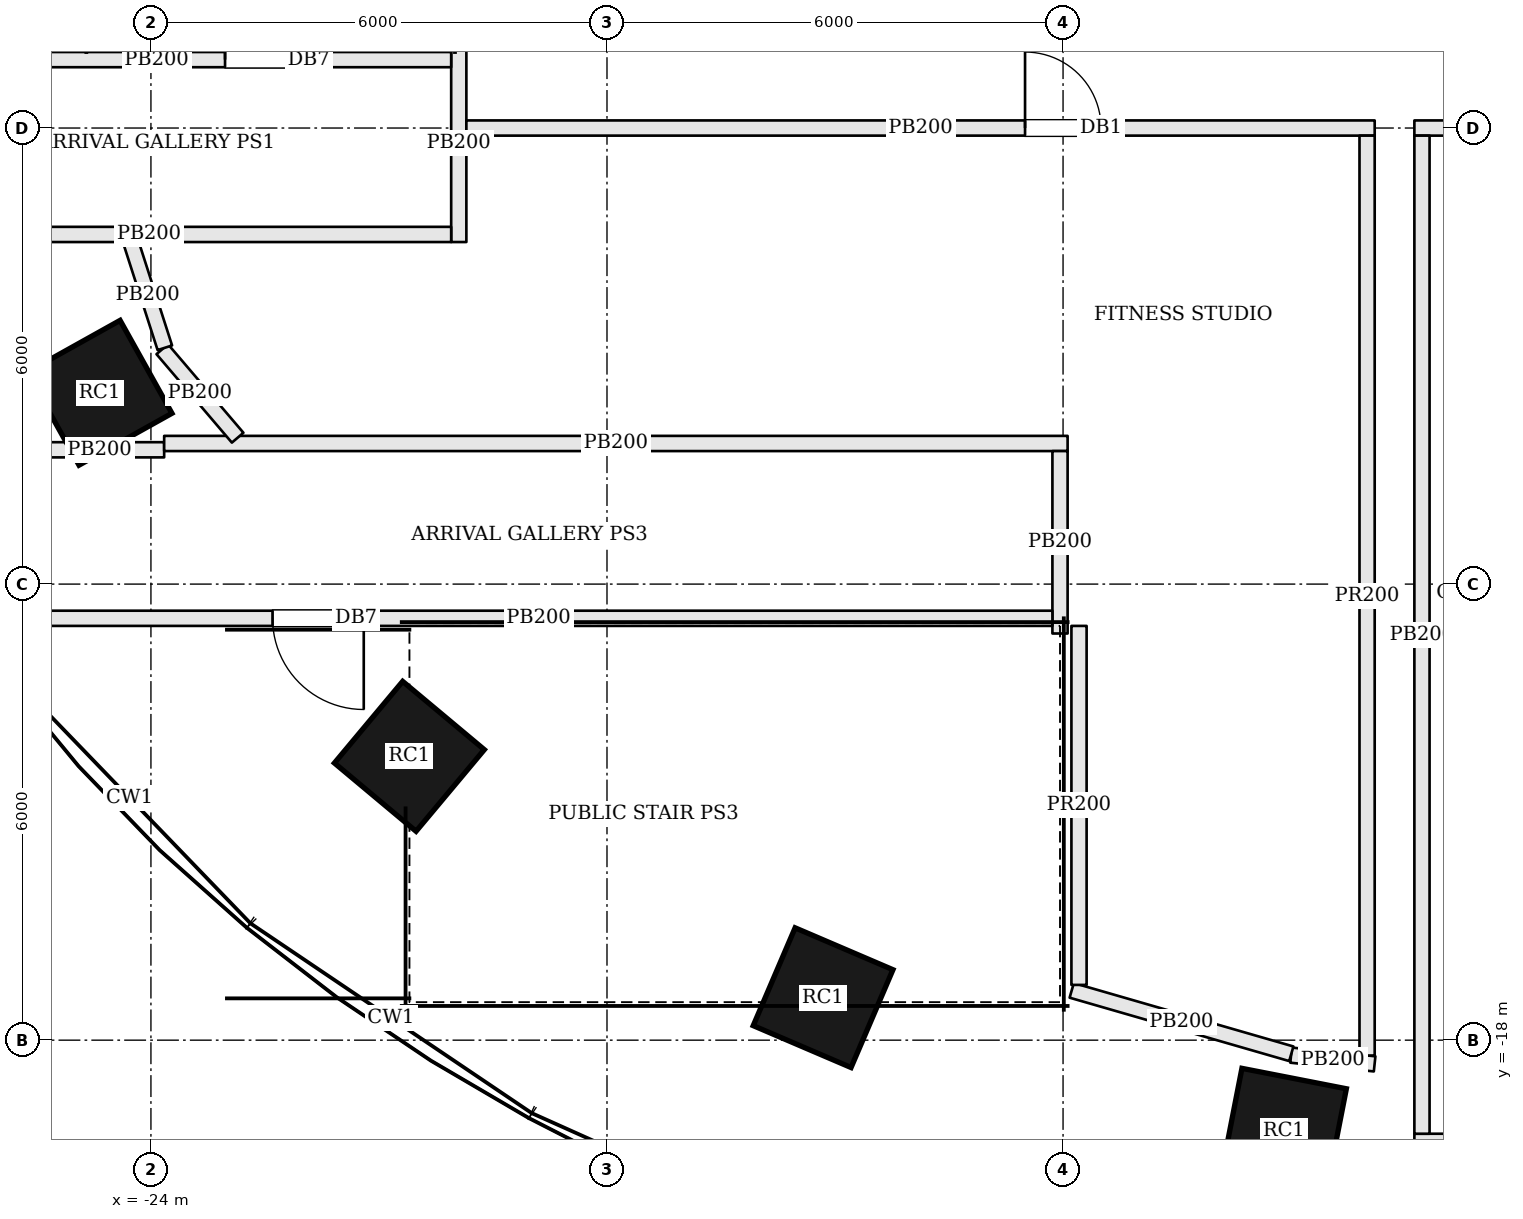
"""IFC4 building model, lengths in metres.
Left out: names, types, materials, properties, quantities, classifications, styles, units other than length and angle.
Written with IfcOpenShell. Run it as: python <this file> out.ifc"""

import sys

from ifc_helpers import new_model, si_unit, direction, frame, frame_2d, origin, origin_2d, place, context, subcontext, project, spatial, rectangle, extrude, element, fill, save


model = new_model("IFC4")
c1 = context("Model", 3, precision=1e-05, world=origin(), true_north=direction((0.0, 1.0)))
c2 = subcontext(c1, "Body", "Model", "MODEL_VIEW")
j1 = project(units=[si_unit("LENGTHUNIT", "METRE"), si_unit("PLANEANGLEUNIT", "RADIAN")], contexts=[c1])
p1 = place(None, origin())
s1 = spatial("IfcSite", under=j1, at=p1, CompositionType="ELEMENT")
p2 = place(p1, origin())
s2 = spatial("IfcBuilding", under=s1, at=p2, CompositionType="ELEMENT")
p3 = place(p2, frame((0.0, 0.0, 28.2)))
s3 = spatial("IfcBuildingStorey", under=s2, at=p3, CompositionType="ELEMENT", Elevation=28.2)
for number, where, z_axis, x_axis in (
    (1, (-24.676, -9.483, 0.0), (0.0, 0.0, 1.0), (0.487, -0.873, 0.0)),
    (2, (-20.6, -14.266, 0.0), (0.0, 0.0, 1.0), (0.767, -0.641, 0.0)),
    (3, (-15.157, -17.441, 0.0), (0.0, 0.0, 1.0), (0.919, -0.394, 0.0)),
    (4, (-9.094, -19.192, 0.0), (0.0, 0.0, 1.0), (0.981, -0.192, 0.0)),
):
    element("IfcColumn", number, at=place(p3, frame(where, z_axis=z_axis, x_axis=x_axis)), inside=s3, PredefinedType="COLUMN", context=c2, shape_type="SweptSolid", body=[
        extrude(rectangle(XDim=1.4, YDim=1.4, at=origin_2d()), origin(), (0.0, 0.0, 1.0), 4.8),
    ])
p4 = place(p3, frame((-19.95, -4.9, 0.0), z_axis=(0.0, 0.0, 1.0), x_axis=(0.0, -1.0, 0.0)))
e5 = element("IfcWall", 5, at=p4, inside=s3, PredefinedType="PARTITIONING", context=c2, shape_type="SweptSolid", body=[
    extrude(rectangle(XDim=2.6, YDim=0.2, at=frame_2d((1.3, 0.0))), origin(), (0.0, 0.0, 1.0), 3.78),
])
p5 = place(p3, frame((-20.05, -7.4, 0.0), z_axis=(0.0, 0.0, 1.0), x_axis=(-1.0, 0.0, 0.0)))
e6 = element("IfcWall", 6, at=p5, inside=s3, PredefinedType="PARTITIONING", context=c2, shape_type="SweptSolid", body=[
    extrude(rectangle(XDim=7.95, YDim=0.2, at=frame_2d((3.975, 0.0))), origin(), (0.0, 0.0, 1.0), 3.78),
])
p6 = place(p5, frame((5.976, 0.0, 0.0)))
e7 = element("IfcOpeningElement", 7, at=p6, cuts=e6, PredefinedType="OPENING", context=c2, shape_type="SweptSolid", body=[
    extrude(rectangle(XDim=1.2, YDim=2.1, at=frame_2d((0.6, 1.05))), frame((0.0, 0.11, 0.0), z_axis=(0.0, -1.0, 0.0), x_axis=(1.0, 0.0, 0.0)), (0.0, 0.0, 1.0), 0.22),
])
p7 = place(p3, frame((-27.8, -5.1, 0.0), z_axis=(0.0, 0.0, 1.0), x_axis=(1.0, 0.0, 0.0)))
e8 = element("IfcWall", 8, at=p7, inside=s3, PredefinedType="PARTITIONING", context=c2, shape_type="SweptSolid", body=[
    extrude(rectangle(XDim=7.75, YDim=0.2, at=frame_2d((3.875, 0.0))), origin(), (0.0, 0.0, 1.0), 3.78),
])
p8 = place(p7, frame((4.775, 0.0, 0.0)))
e9 = element("IfcOpeningElement", 9, at=p8, cuts=e8, PredefinedType="OPENING", context=c2, shape_type="SweptSolid", body=[
    extrude(rectangle(XDim=1.2, YDim=2.1, at=frame_2d((0.6, 1.05))), frame((0.0, 0.11, 0.0), z_axis=(0.0, -1.0, 0.0), x_axis=(1.0, 0.0, 0.0)), (0.0, 0.0, 1.0), 0.22),
])
p9 = place(p3, frame((-25.526, -10.233, 0.0), z_axis=(0.0, 0.0, 1.0), x_axis=(1.0, 0.0, 0.0)))
e10 = element("IfcWall", 10, at=p9, inside=s3, PredefinedType="PARTITIONING", context=c2, shape_type="SweptSolid", body=[
    extrude(rectangle(XDim=1.7, YDim=0.2, at=frame_2d((0.85, 0.0))), origin(), (0.0, 0.0, 1.0), 3.78),
])
p10 = place(p3, frame((-23.826, -10.15, 0.0), z_axis=(0.0, 0.0, 1.0), x_axis=(1.0, 0.0, 0.0)))
e11 = element("IfcWall", 11, at=p10, inside=s3, PredefinedType="PARTITIONING", context=c2, shape_type="SweptSolid", body=[
    extrude(rectangle(XDim=11.886, YDim=0.2, at=frame_2d((5.943, 0.0))), origin(), (0.0, 0.0, 1.0), 3.78),
])
p11 = place(p3, frame((-12.04, -10.25, 0.0), z_axis=(0.0, 0.0, 1.0), x_axis=(0.0, -1.0, 0.0)))
e12 = element("IfcWall", 12, at=p11, inside=s3, PredefinedType="PARTITIONING", context=c2, shape_type="SweptSolid", body=[
    extrude(rectangle(XDim=2.4, YDim=0.2, at=frame_2d((1.2, 0.0))), origin(), (0.0, 0.0, 1.0), 3.78),
])
p12 = place(p3, frame((-12.14, -12.45, 0.0), z_axis=(0.0, 0.0, 1.0), x_axis=(-1.0, 0.0, 0.0)))
e13 = element("IfcWall", 13, at=p12, inside=s3, PredefinedType="PARTITIONING", context=c2, shape_type="SweptSolid", body=[
    extrude(rectangle(XDim=13.52, YDim=0.2, at=frame_2d((6.76, 0.0))), origin(), (0.0, 0.0, 1.0), 3.78),
])
p13 = place(p12, frame((9.06, 0.0, 0.0)))
e14 = element("IfcOpeningElement", 14, at=p13, cuts=e13, PredefinedType="OPENING", context=c2, shape_type="SweptSolid", body=[
    extrude(rectangle(XDim=1.2, YDim=2.1, at=frame_2d((0.6, 1.05))), frame((0.0, 0.11, 0.0), z_axis=(0.0, -1.0, 0.0), x_axis=(1.0, 0.0, 0.0)), (0.0, 0.0, 1.0), 0.22),
])
p14 = place(p3, frame((-7.378, -6.0, 0.0), z_axis=(0.0, 0.0, 1.0), x_axis=(1.0, 0.0, 0.0)))
e15 = element("IfcWall", 15, at=p14, inside=s3, PredefinedType="PARTITIONING", context=c2, shape_type="SweptSolid", body=[
    extrude(rectangle(XDim=25.978, YDim=0.2, at=frame_2d((12.989, 0.0))), origin(), (0.0, 0.0, 1.0), 3.78),
])
p15 = place(p14, frame((0.7, 0.0, 0.0)))
e16 = element("IfcOpeningElement", 16, at=p15, cuts=e15, PredefinedType="OPENING", context=c2, shape_type="SweptSolid", body=[
    extrude(rectangle(XDim=1.2, YDim=2.1, at=frame_2d((0.6, 1.05))), frame((0.0, 0.11, 0.0), z_axis=(0.0, -1.0, 0.0), x_axis=(1.0, 0.0, 0.0)), (0.0, 0.0, 1.0), 0.22),
])
p16 = place(p14, frame((5.939, 0.0, 0.0)))
e17 = element("IfcOpeningElement", 17, at=p16, cuts=e15, PredefinedType="OPENING", context=c2, shape_type="SweptSolid", body=[
    extrude(rectangle(XDim=1.0, YDim=2.1, at=frame_2d((0.5, 1.05))), frame((0.0, 0.11, 0.0), z_axis=(0.0, -1.0, 0.0), x_axis=(1.0, 0.0, 0.0)), (0.0, 0.0, 1.0), 0.22),
])
p17 = place(p14, frame((13.628, 0.0, 0.0)))
e18 = element("IfcOpeningElement", 18, at=p17, cuts=e15, PredefinedType="OPENING", context=c2, shape_type="SweptSolid", body=[
    extrude(rectangle(XDim=1.0, YDim=2.1, at=frame_2d((0.5, 1.05))), frame((0.0, 0.11, 0.0), z_axis=(0.0, -1.0, 0.0), x_axis=(1.0, 0.0, 0.0)), (0.0, 0.0, 1.0), 0.22),
])
p18 = place(p14, frame((20.128, 0.0, 0.0)))
e19 = element("IfcOpeningElement", 19, at=p18, cuts=e15, PredefinedType="OPENING", context=c2, shape_type="SweptSolid", body=[
    extrude(rectangle(XDim=1.0, YDim=2.1, at=frame_2d((0.5, 1.05))), frame((0.0, 0.11, 0.0), z_axis=(0.0, -1.0, 0.0), x_axis=(1.0, 0.0, 0.0)), (0.0, 0.0, 1.0), 0.22),
])
p19 = place(p3, frame((-4.978, -19.331, 0.0), z_axis=(0.0, 0.0, 1.0), x_axis=(-1.0, 0.0, 0.0)))
e20 = element("IfcWall", 20, at=p19, inside=s3, PredefinedType="PARTITIONING", context=c2, shape_type="SweptSolid", body=[
    extrude(rectangle(XDim=2.4, YDim=0.2, at=frame_2d((1.2, 0.0))), origin(), (0.0, 0.0, 1.0), 3.78),
])
p20 = place(p19, frame((0.5, 0.0, 0.0)))
e21 = element("IfcOpeningElement", 21, at=p20, cuts=e20, PredefinedType="OPENING", context=c2, shape_type="SweptSolid", body=[
    extrude(rectangle(XDim=1.2, YDim=2.1, at=frame_2d((0.6, 1.05))), frame((0.0, 0.11, 0.0), z_axis=(0.0, -1.0, 0.0), x_axis=(1.0, 0.0, 0.0)), (0.0, 0.0, 1.0), 0.22),
])
p21 = place(p3, frame((-7.278, -19.231, 0.0), z_axis=(0.0, 0.0, 1.0), x_axis=(0.0, 1.0, 0.0)))
e22 = element("IfcWall", 22, at=p21, inside=s3, PredefinedType="PARTITIONING", context=c2, shape_type="SweptSolid", body=[
    extrude(rectangle(XDim=13.131, YDim=0.2, at=frame_2d((6.565, 0.0))), origin(), (0.0, 0.0, 1.0), 3.78),
])
p22 = place(p3, frame((-7.901, -18.312, 0.0), z_axis=(0.0, 0.0, 1.0), x_axis=(-0.994571829754, 0.104052272726, 0.0)))
e23 = element("IfcWall", 23, at=p22, inside=s3, PredefinedType="PARTITIONING", context=c2, shape_type="SweptSolid", body=[
    extrude(rectangle(XDim=1.105, YDim=0.2, at=frame_2d((0.553, 0.0))), origin(), (0.0, 0.0, 1.0), 3.78),
])
p23 = place(p3, frame((-8.997, -18.179, 0.0), z_axis=(0.0, 0.0, 1.0), x_axis=(-0.960766604917, 0.277358127474, 0.0)))
e24 = element("IfcWall", 24, at=p23, inside=s3, PredefinedType="PARTITIONING", context=c2, shape_type="SweptSolid", body=[
    extrude(rectangle(XDim=3.007, YDim=0.2, at=frame_2d((1.503, 0.0))), origin(), (0.0, 0.0, 1.0), 3.78),
])
p24 = place(p3, frame((-11.79, -17.273, 0.0), z_axis=(0.0, 0.0, 1.0), x_axis=(0.0, 1.0, 0.0)))
e25 = element("IfcWall", 25, at=p24, inside=s3, PredefinedType="PARTITIONING", context=c2, shape_type="SweptSolid", body=[
    extrude(rectangle(XDim=4.723, YDim=0.2, at=frame_2d((2.361, 0.0))), origin(), (0.0, 0.0, 1.0), 3.78),
])
p25 = place(p3, frame((-22.859, -10.074, 0.0), z_axis=(0.0, 0.0, 1.0), x_axis=(-0.648685680777, 0.761056428628, 0.0)))
e26 = element("IfcWall", 26, at=p25, inside=s3, PredefinedType="PARTITIONING", context=c2, shape_type="SweptSolid", body=[
    extrude(rectangle(XDim=1.53, YDim=0.2, at=frame_2d((0.765, 0.0))), origin(), (0.0, 0.0, 1.0), 3.78),
])
p26 = place(p3, frame((-23.817, -8.891, 0.0), z_axis=(0.0, 0.0, 1.0), x_axis=(-0.306321721395, 0.951928045076, 0.0)))
e27 = element("IfcWall", 27, at=p26, inside=s3, PredefinedType="PARTITIONING", context=c2, shape_type="SweptSolid", body=[
    extrude(rectangle(XDim=1.467, YDim=0.2, at=frame_2d((0.733, 0.0))), origin(), (0.0, 0.0, 1.0), 3.78),
])
p27 = place(p3, frame((-19.85, -6.0, 0.0), z_axis=(0.0, 0.0, 1.0), x_axis=(1.0, 0.0, 0.0)))
e28 = element("IfcWall", 28, at=p27, inside=s3, PredefinedType="PARTITIONING", context=c2, shape_type="SweptSolid", body=[
    extrude(rectangle(XDim=11.95, YDim=0.2, at=frame_2d((5.975, 0.0))), origin(), (0.0, 0.0, 1.0), 3.78),
])
p28 = place(p27, frame((7.35, 0.0, 0.0)))
e29 = element("IfcOpeningElement", 29, at=p28, cuts=e28, PredefinedType="OPENING", context=c2, shape_type="SweptSolid", body=[
    extrude(rectangle(XDim=1.0, YDim=2.1, at=frame_2d((0.5, 1.05))), frame((0.0, 0.11, 0.0), z_axis=(0.0, -1.0, 0.0), x_axis=(1.0, 0.0, 0.0)), (0.0, 0.0, 1.0), 0.22),
])
p29 = place(p3, frame((-8.0, -6.1, 0.0), z_axis=(0.0, 0.0, 1.0), x_axis=(0.0, -1.0, 0.0)))
e30 = element("IfcWall", 30, at=p29, inside=s3, PredefinedType="PARTITIONING", context=c2, shape_type="SweptSolid", body=[
    extrude(rectangle(XDim=12.102, YDim=0.2, at=frame_2d((6.051, 0.0))), origin(), (0.0, 0.0, 1.0), 3.78),
])
p30 = place(p8, origin())
e31 = element("IfcDoor", 31, at=p30, inside=s3, OperationType="SINGLE_SWING_LEFT", PredefinedType="DOOR", context=c2, shape_type="SweptSolid", body=[
    extrude(rectangle(XDim=1.2, YDim=2.1, at=frame_2d((0.6, 1.05))), frame((0.0, 0.025, 0.0), z_axis=(0.0, -1.0, 0.0), x_axis=(1.0, 0.0, 0.0)), (0.0, 0.0, 1.0), 0.05),
])
fill(e9, e31)
p31 = place(p13, origin())
e32 = element("IfcDoor", 32, at=p31, inside=s3, OperationType="SINGLE_SWING_LEFT", PredefinedType="DOOR", context=c2, shape_type="SweptSolid", body=[
    extrude(rectangle(XDim=1.2, YDim=2.1, at=frame_2d((0.6, 1.05))), frame((0.0, 0.025, 0.0), z_axis=(0.0, -1.0, 0.0), x_axis=(1.0, 0.0, 0.0)), (0.0, 0.0, 1.0), 0.05),
])
fill(e14, e32)
p32 = place(p28, origin())
e33 = element("IfcDoor", 33, at=p32, inside=s3, OperationType="SINGLE_SWING_LEFT", PredefinedType="DOOR", context=c2, shape_type="SweptSolid", body=[
    extrude(rectangle(XDim=1.0, YDim=2.1, at=frame_2d((0.5, 1.05))), frame((0.0, 0.025, 0.0), z_axis=(0.0, -1.0, 0.0), x_axis=(1.0, 0.0, 0.0)), (0.0, 0.0, 1.0), 0.05),
])
fill(e29, e33)
save(model, sys.argv[1])
